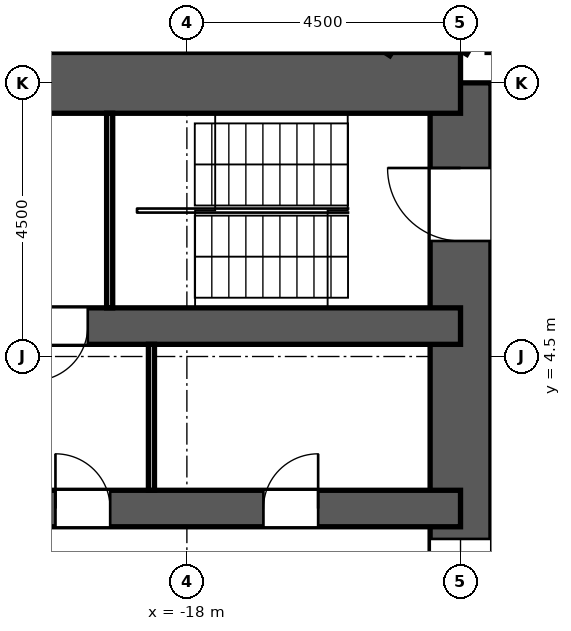
"""IFC4 building model, lengths in metres.
Left out: names, types, materials, properties, quantities, classifications, styles, units other than length and angle.
Written with IfcOpenShell. Run it as: python <this file> out.ifc"""

import sys

from ifc_helpers import new_model, si_unit, direction, frame, frame_2d, origin, place, context, subcontext, project, spatial, rectangle, extrude, element, fill, save


model = new_model("IFC4")
c1 = context("Model", 3, precision=1e-05, world=origin(), true_north=direction((0.0, 1.0)))
c2 = subcontext(c1, "Body", "Model", "MODEL_VIEW")
j1 = project(units=[si_unit("LENGTHUNIT", "METRE"), si_unit("PLANEANGLEUNIT", "RADIAN")], contexts=[c1])
p1 = place(None, origin())
s1 = spatial("IfcSite", under=j1, at=p1, CompositionType="ELEMENT")
p2 = place(p1, origin())
s2 = spatial("IfcBuilding", under=s1, at=p2, CompositionType="ELEMENT")
p3 = place(p2, frame((0.0, 0.0, 65.9)))
s3 = spatial("IfcBuildingStorey", under=s2, at=p3, CompositionType="ELEMENT", Elevation=65.9)
p4 = place(p3, frame((-13.5, -9.0, 0.0), z_axis=(0.0, 0.0, 1.0), x_axis=(0.0, 1.0, 0.0)))
e1 = element("IfcWall", 1, at=p4, inside=s3, PredefinedType="SHEAR", context=c2, shape_type="SweptSolid", body=[
    extrude(rectangle(XDim=18.0, YDim=1.0, at=frame_2d((9.0, 0.0))), origin(), (0.0, 0.0, 1.0), 3.3),
])
p5 = place(p4, frame((15.4, 0.0, 0.0)))
e2 = element("IfcOpeningElement", 2, at=p5, cuts=e1, PredefinedType="OPENING", context=c2, shape_type="SweptSolid", body=[
    extrude(rectangle(XDim=1.2, YDim=2.1, at=frame_2d((0.6, 1.05))), frame((0.0, 0.512, 0.0), z_axis=(0.0, -1.0, 0.0), x_axis=(1.0, 0.0, 0.0)), (0.0, 0.0, 1.0), 1.024),
])
p6 = place(p4, frame((1.4, 0.0, 0.0)))
e3 = element("IfcOpeningElement", 3, at=p6, cuts=e1, PredefinedType="OPENING", context=c2, shape_type="SweptSolid", body=[
    extrude(rectangle(XDim=1.2, YDim=2.1, at=frame_2d((0.6, 1.05))), frame((0.0, 0.512, 0.0), z_axis=(0.0, -1.0, 0.0), x_axis=(1.0, 0.0, 0.0)), (0.0, 0.0, 1.0), 1.024),
])
p7 = place(p4, frame((7.5, 0.0, 0.0)))
e4 = element("IfcOpeningElement", 4, at=p7, cuts=e1, PredefinedType="OPENING", context=c2, shape_type="SweptSolid", body=[
    extrude(rectangle(XDim=3.0, YDim=2.4, at=frame_2d((1.5, 1.2))), frame((0.0, 0.512, 0.0), z_axis=(0.0, -1.0, 0.0), x_axis=(1.0, 0.0, 0.0)), (0.0, 0.0, 1.0), 1.024),
])
p8 = place(p3, frame((-13.5, 9.0, 0.0), z_axis=(0.0, 0.0, 1.0), x_axis=(-1.0, 0.0, 0.0)))
e5 = element("IfcWall", 5, at=p8, inside=s3, PredefinedType="SHEAR", context=c2, shape_type="SweptSolid", body=[
    extrude(rectangle(XDim=12.4, YDim=1.0, at=frame_2d((6.2, 0.0))), origin(), (0.0, 0.0, 1.0), 3.3),
])
p9 = place(p3, frame((-13.5, 5.0, 0.0), z_axis=(0.0, 0.0, 1.0), x_axis=(-1.0, 0.0, 0.0)))
e6 = element("IfcWall", 6, at=p9, inside=s3, PredefinedType="SHEAR", context=c2, shape_type="SweptSolid", body=[
    extrude(rectangle(XDim=12.4, YDim=0.6, at=frame_2d((6.2, 0.0))), origin(), (0.0, 0.0, 1.0), 3.3),
])
p10 = place(p9, frame((6.13, 0.0, 0.0)))
e7 = element("IfcOpeningElement", 7, at=p10, cuts=e6, PredefinedType="OPENING", context=c2, shape_type="SweptSolid", body=[
    extrude(rectangle(XDim=0.9, YDim=2.1, at=frame_2d((0.45, 1.05))), frame((0.0, 0.312, 0.0), z_axis=(0.0, -1.0, 0.0), x_axis=(1.0, 0.0, 0.0)), (0.0, 0.0, 1.0), 0.624),
])
p11 = place(p9, frame((9.74, 0.0, 0.0)))
e8 = element("IfcOpeningElement", 8, at=p11, cuts=e6, PredefinedType="OPENING", context=c2, shape_type="SweptSolid", body=[
    extrude(rectangle(XDim=0.9, YDim=2.1, at=frame_2d((0.45, 1.05))), frame((0.0, 0.312, 0.0), z_axis=(0.0, -1.0, 0.0), x_axis=(1.0, 0.0, 0.0)), (0.0, 0.0, 1.0), 0.624),
])
p12 = place(p3, frame((-13.5, 2.0, 0.0), z_axis=(0.0, 0.0, 1.0), x_axis=(-1.0, 0.0, 0.0)))
e9 = element("IfcWall", 9, at=p12, inside=s3, PredefinedType="SHEAR", context=c2, shape_type="SweptSolid", body=[
    extrude(rectangle(XDim=12.4, YDim=0.6, at=frame_2d((6.2, 0.0))), origin(), (0.0, 0.0, 1.0), 3.3),
])
p13 = place(p12, frame((7.65, 0.0, 0.0)))
e10 = element("IfcOpeningElement", 10, at=p13, cuts=e9, PredefinedType="OPENING", context=c2, shape_type="SweptSolid", body=[
    extrude(rectangle(XDim=1.1, YDim=2.1, at=frame_2d((0.55, 1.05))), frame((0.0, 0.312, 0.0), z_axis=(0.0, -1.0, 0.0), x_axis=(1.0, 0.0, 0.0)), (0.0, 0.0, 1.0), 0.624),
])
p14 = place(p12, frame((2.341, 0.0, 0.0)))
e11 = element("IfcOpeningElement", 11, at=p14, cuts=e9, PredefinedType="OPENING", context=c2, shape_type="SweptSolid", body=[
    extrude(rectangle(XDim=0.9, YDim=2.1, at=frame_2d((0.45, 1.05))), frame((0.0, 0.312, 0.0), z_axis=(0.0, -1.0, 0.0), x_axis=(1.0, 0.0, 0.0)), (0.0, 0.0, 1.0), 0.624),
])
p15 = place(p12, frame((5.761, 0.0, 0.0)))
e12 = element("IfcOpeningElement", 12, at=p15, cuts=e9, PredefinedType="OPENING", context=c2, shape_type="SweptSolid", body=[
    extrude(rectangle(XDim=0.9, YDim=2.1, at=frame_2d((0.45, 1.05))), frame((0.0, 0.312, 0.0), z_axis=(0.0, -1.0, 0.0), x_axis=(1.0, 0.0, 0.0)), (0.0, 0.0, 1.0), 0.624),
])
p16 = place(p12, frame((9.74, 0.0, 0.0)))
e13 = element("IfcOpeningElement", 13, at=p16, cuts=e9, PredefinedType="OPENING", context=c2, shape_type="SweptSolid", body=[
    extrude(rectangle(XDim=0.9, YDim=2.1, at=frame_2d((0.45, 1.05))), frame((0.0, 0.312, 0.0), z_axis=(0.0, -1.0, 0.0), x_axis=(1.0, 0.0, 0.0)), (0.0, 0.0, 1.0), 0.624),
])
p17 = place(p12, frame((10.88, 0.0, 0.0)))
e14 = element("IfcOpeningElement", 14, at=p17, cuts=e9, PredefinedType="OPENING", context=c2, shape_type="SweptSolid", body=[
    extrude(rectangle(XDim=0.9, YDim=2.1, at=frame_2d((0.45, 1.05))), frame((0.0, 0.312, 0.0), z_axis=(0.0, -1.0, 0.0), x_axis=(1.0, 0.0, 0.0)), (0.0, 0.0, 1.0), 0.624),
])
p18 = place(p3, frame((-15.789, 10.253, 0.0), z_axis=(0.0, 0.0, 1.0), x_axis=(0.838830573332, -0.544392569056, 0.0)))
e15 = element("IfcWall", 15, at=p18, inside=s3, PredefinedType="PARTITIONING", context=c2, shape_type="SweptSolid", body=[
    extrude(rectangle(XDim=1.383, YDim=0.125, at=frame_2d((0.691, 0.0))), origin(), (0.0, 0.0, 1.0), 2.75),
])
p19 = place(p3, frame((-13.452, 9.5, 0.0), z_axis=(0.0, 0.0, 1.0), x_axis=(0.49991670217, 0.866073490468, 0.0)))
e16 = element("IfcWall", 16, at=p19, inside=s3, PredefinedType="PARTITIONING", context=c2, shape_type="SweptSolid", body=[
    extrude(rectangle(XDim=0.834, YDim=0.125, at=frame_2d((0.417, 0.0))), origin(), (0.0, 0.0, 1.0), 2.75),
])
p20 = place(p3, frame((-18.583, 2.3, 0.0), z_axis=(0.0, 0.0, 1.0), x_axis=(0.0, 1.0, 0.0)))
e17 = element("IfcWall", 17, at=p20, inside=s3, PredefinedType="PARTITIONING", context=c2, shape_type="SweptSolid", body=[
    extrude(rectangle(XDim=2.4, YDim=0.1, at=frame_2d((1.2, 0.0))), origin(), (0.0, 0.0, 1.0), 2.75),
])
p21 = place(p3, frame((-19.27, 5.3, 0.0), z_axis=(0.0, 0.0, 1.0), x_axis=(0.0, 1.0, 0.0)))
e18 = element("IfcWall", 18, at=p21, inside=s3, PredefinedType="PARTITIONING", context=c2, shape_type="SweptSolid", body=[
    extrude(rectangle(XDim=3.2, YDim=0.1, at=frame_2d((1.6, 0.0))), origin(), (0.0, 0.0, 1.0), 2.75),
])
p22 = place(p14, frame((0.9, 0.0, 0.0), z_axis=(0.0, 0.0, 1.0), x_axis=(-1.0, 0.0, 0.0)))
e19 = element("IfcDoor", 19, at=p22, inside=s3, OperationType="SINGLE_SWING_RIGHT", PredefinedType="DOOR", context=c2, shape_type="SweptSolid", body=[
    extrude(rectangle(XDim=0.9, YDim=2.1, at=frame_2d((0.45, 1.05))), frame((0.0, 0.025, 0.0), z_axis=(0.0, -1.0, 0.0), x_axis=(1.0, 0.0, 0.0)), (0.0, 0.0, 1.0), 0.05),
])
fill(e11, e19)
p23 = place(p15, frame((0.9, 0.0, 0.0), z_axis=(0.0, 0.0, 1.0), x_axis=(-1.0, 0.0, 0.0)))
e20 = element("IfcDoor", 20, at=p23, inside=s3, OperationType="SINGLE_SWING_LEFT", PredefinedType="DOOR", context=c2, shape_type="SweptSolid", body=[
    extrude(rectangle(XDim=0.9, YDim=2.1, at=frame_2d((0.45, 1.05))), frame((0.0, 0.025, 0.0), z_axis=(0.0, -1.0, 0.0), x_axis=(1.0, 0.0, 0.0)), (0.0, 0.0, 1.0), 0.05),
])
fill(e12, e20)
p24 = place(p10, origin())
e21 = element("IfcDoor", 21, at=p24, inside=s3, OperationType="SINGLE_SWING_RIGHT", PredefinedType="DOOR", context=c2, shape_type="SweptSolid", body=[
    extrude(rectangle(XDim=0.9, YDim=2.1, at=frame_2d((0.45, 1.05))), frame((0.0, 0.025, 0.0), z_axis=(0.0, -1.0, 0.0), x_axis=(1.0, 0.0, 0.0)), (0.0, 0.0, 1.0), 0.05),
])
fill(e7, e21)
p25 = place(p5, origin())
e22 = element("IfcDoor", 22, at=p25, inside=s3, OperationType="SINGLE_SWING_RIGHT", PredefinedType="DOOR", context=c2, shape_type="SweptSolid", body=[
    extrude(rectangle(XDim=1.2, YDim=2.1, at=frame_2d((0.6, 1.05))), frame((0.0, 0.025, 0.0), z_axis=(0.0, -1.0, 0.0), x_axis=(1.0, 0.0, 0.0)), (0.0, 0.0, 1.0), 0.05),
])
fill(e2, e22)
p26 = place(p7, origin())
e23 = element("IfcDoor", 23, at=p26, inside=s3, OperationType="DOUBLE_DOOR_SLIDING", PredefinedType="DOOR", context=c2, shape_type="SweptSolid", body=[
    extrude(rectangle(XDim=3.0, YDim=2.4, at=frame_2d((1.5, 1.2))), frame((0.0, 0.025, 0.0), z_axis=(0.0, -1.0, 0.0), x_axis=(1.0, 0.0, 0.0)), (0.0, 0.0, 1.0), 0.05),
])
fill(e4, e23)
save(model, sys.argv[1])
